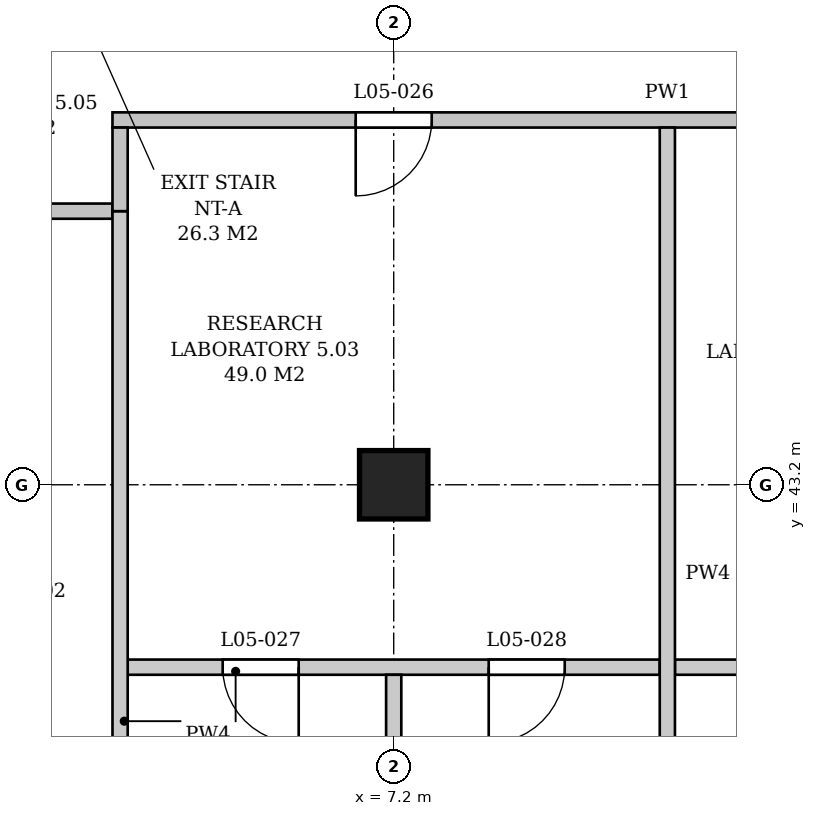
"""IFC4 building model, lengths in metres.
Left out: names, types, materials, properties, quantities, classifications, styles, units other than length and angle.
Written with IfcOpenShell. Run it as: python <this file> out.ifc"""

import sys

from ifc_helpers import new_model, si_unit, direction, frame, frame_2d, origin, origin_2d, place, context, subcontext, project, spatial, polyline, rectangle, outline, extrude, element, fill, save


model = new_model("IFC4")
c1 = context("Model", 3, precision=1e-05, world=origin(), true_north=direction((0.0, 1.0)))
c2 = subcontext(c1, "Body", "Model", "MODEL_VIEW")
j1 = project(units=[si_unit("LENGTHUNIT", "METRE"), si_unit("PLANEANGLEUNIT", "RADIAN")], contexts=[c1])
p1 = place(None, origin())
s1 = spatial("IfcSite", under=j1, at=p1, CompositionType="ELEMENT")
p2 = place(p1, origin())
s2 = spatial("IfcBuilding", under=s1, at=p2, CompositionType="ELEMENT")
p3 = place(p2, frame((0.0, 0.0, 26.4)))
s3 = spatial("IfcBuildingStorey", under=s2, at=p3, CompositionType="ELEMENT", Elevation=26.4)
p4 = place(p3, frame((7.2, 43.2, 0.0), z_axis=(0.0, 0.0, 1.0), x_axis=(1.0, 0.0, 0.0)))
e1 = element("IfcColumn", 1, at=p4, inside=s3, PredefinedType="COLUMN", context=c2, shape_type="SweptSolid", body=[
    extrude(rectangle(XDim=0.9, YDim=0.9, at=origin_2d()), origin(), (0.0, 0.0, 1.0), 4.8),
])
p5 = place(p3, frame((3.7, 40.8, 0.0), z_axis=(0.0, 0.0, 1.0), x_axis=(1.0, 0.0, 0.0)))
e2 = element("IfcWall", 2, at=p5, inside=s3, PredefinedType="PARTITIONING", context=c2, shape_type="SweptSolid", body=[
    extrude(outline(polyline([(0.0, 0.0), (7.0, 0.0), (7.0, 4.55), (3.75, 4.55), (3.75, 3.8), (3.25, 3.8), (3.25, 4.55), (0.0, 4.55), (0.0, 0.0)])), frame((0.0, 0.1, 0.0), z_axis=(0.0, -1.0, 0.0), x_axis=(1.0, 0.0, 0.0)), (0.0, 0.0, 1.0), 0.2),
])
p6 = place(p5, frame((1.25, 0.0, 0.0)))
e3 = element("IfcOpeningElement", 3, at=p6, cuts=e2, PredefinedType="OPENING", context=c2, shape_type="SweptSolid", body=[
    extrude(rectangle(XDim=1.0, YDim=2.1, at=frame_2d((0.5, 1.05))), frame((0.0, 0.11, 0.0), z_axis=(0.0, -1.0, 0.0), x_axis=(1.0, 0.0, 0.0)), (0.0, 0.0, 1.0), 0.22),
])
p7 = place(p5, frame((4.75, 0.0, 0.0)))
e4 = element("IfcOpeningElement", 4, at=p7, cuts=e2, PredefinedType="OPENING", context=c2, shape_type="SweptSolid", body=[
    extrude(rectangle(XDim=1.0, YDim=2.1, at=frame_2d((0.5, 1.05))), frame((0.0, 0.11, 0.0), z_axis=(0.0, -1.0, 0.0), x_axis=(1.0, 0.0, 0.0)), (0.0, 0.0, 1.0), 0.22),
])
p8 = place(p3, frame((10.9, 40.8, 0.0), z_axis=(0.0, 0.0, 1.0), x_axis=(1.0, 0.0, 0.0)))
e5 = element("IfcWall", 5, at=p8, inside=s3, PredefinedType="PARTITIONING", context=c2, shape_type="SweptSolid", body=[
    extrude(outline(polyline([(0.0, 0.0), (3.4, 0.0), (3.4, 3.8), (3.25, 3.8), (3.25, 4.55), (0.0, 4.55), (0.0, 0.0)])), frame((0.0, 0.1, 0.0), z_axis=(0.0, -1.0, 0.0), x_axis=(1.0, 0.0, 0.0)), (0.0, 0.0, 1.0), 0.2),
])
p9 = place(p8, frame((1.2, 0.0, 0.0)))
e6 = element("IfcOpeningElement", 6, at=p9, cuts=e5, PredefinedType="OPENING", context=c2, shape_type="SweptSolid", body=[
    extrude(rectangle(XDim=1.0, YDim=2.1, at=frame_2d((0.5, 1.05))), frame((0.0, 0.11, 0.0), z_axis=(0.0, -1.0, 0.0), x_axis=(1.0, 0.0, 0.0)), (0.0, 0.0, 1.0), 0.22),
])
p10 = place(p3, frame((0.15, 46.8, 0.0), z_axis=(0.0, 0.0, 1.0), x_axis=(1.0, 0.0, 0.0)))
e7 = element("IfcWall", 7, at=p10, inside=s3, PredefinedType="PARTITIONING", context=c2, shape_type="SweptSolid", body=[
    extrude(outline(polyline([(0.0, 0.0), (3.35, 0.0), (3.35, 4.55), (0.1, 4.55), (0.1, 3.95), (0.0, 3.95), (0.0, 0.0)])), frame((0.0, 0.1, 0.0), z_axis=(0.0, -1.0, 0.0), x_axis=(1.0, 0.0, 0.0)), (0.0, 0.0, 1.0), 0.2),
])
p11 = place(p10, frame((1.175, 0.0, 0.0)))
e8 = element("IfcOpeningElement", 8, at=p11, cuts=e7, PredefinedType="OPENING", context=c2, shape_type="SweptSolid", body=[
    extrude(rectangle(XDim=1.0, YDim=2.1, at=frame_2d((0.5, 1.05))), frame((0.0, 0.11, 0.0), z_axis=(0.0, -1.0, 0.0), x_axis=(1.0, 0.0, 0.0)), (0.0, 0.0, 1.0), 0.22),
])
p12 = place(p3, frame((3.5, 48.0, 0.0), z_axis=(0.0, 0.0, 1.0), x_axis=(1.0, 0.0, 0.0)))
e9 = element("IfcWall", 9, at=p12, inside=s3, PredefinedType="PARTITIONING", context=c2, shape_type="SweptSolid", body=[
    extrude(outline(polyline([(0.0, 0.0), (14.6, 0.0), (14.6, 4.55), (11.15, 4.55), (11.15, 3.8), (10.65, 3.8), (10.65, 4.55), (3.95, 4.55), (3.95, 3.8), (3.45, 3.8), (3.45, 4.55), (0.0, 4.55), (0.0, 0.0)])), frame((0.0, 0.1, 0.0), z_axis=(0.0, -1.0, 0.0), x_axis=(1.0, 0.0, 0.0)), (0.0, 0.0, 1.0), 0.2),
])
p13 = place(p12, frame((3.2, 0.0, 0.0)))
e10 = element("IfcOpeningElement", 10, at=p13, cuts=e9, PredefinedType="OPENING", context=c2, shape_type="SweptSolid", body=[
    extrude(rectangle(XDim=1.0, YDim=2.1, at=frame_2d((0.5, 1.05))), frame((0.0, 0.11, 0.0), z_axis=(0.0, -1.0, 0.0), x_axis=(1.0, 0.0, 0.0)), (0.0, 0.0, 1.0), 0.22),
])
p14 = place(p12, frame((8.6, 0.0, 0.0)))
e11 = element("IfcOpeningElement", 11, at=p14, cuts=e9, PredefinedType="OPENING", context=c2, shape_type="SweptSolid", body=[
    extrude(rectangle(XDim=1.0, YDim=2.1, at=frame_2d((0.5, 1.05))), frame((0.0, 0.11, 0.0), z_axis=(0.0, -1.0, 0.0), x_axis=(1.0, 0.0, 0.0)), (0.0, 0.0, 1.0), 0.22),
])
p15 = place(p3, frame((3.6, 36.15, 0.0), z_axis=(0.0, 0.0, 1.0), x_axis=(0.0, 1.0, 0.0)))
e12 = element("IfcWall", 12, at=p15, inside=s3, PredefinedType="PARTITIONING", context=c2, shape_type="SweptSolid", body=[
    extrude(outline(polyline([(0.0, 0.0), (10.65, 0.0), (10.65, 4.55), (7.3, 4.55), (7.3, 3.8), (6.8, 3.8), (6.8, 4.55), (0.1, 4.55), (0.1, 3.95), (0.0, 3.95), (0.0, 0.0)])), frame((0.0, 0.1, 0.0), z_axis=(0.0, -1.0, 0.0), x_axis=(1.0, 0.0, 0.0)), (0.0, 0.0, 1.0), 0.2),
])
p16 = place(p3, frame((3.6, 46.8, 0.0), z_axis=(0.0, 0.0, 1.0), x_axis=(0.0, 1.0, 0.0)))
e13 = element("IfcWall", 13, at=p16, inside=s3, PredefinedType="PARTITIONING", context=c2, shape_type="SweptSolid", body=[
    extrude(rectangle(XDim=1.1, YDim=0.2, at=frame_2d((0.55, 0.0))), origin(), (0.0, 0.0, 1.0), 4.55),
])
p17 = place(p3, frame((7.2, 36.45, 0.0), z_axis=(0.0, 0.0, 1.0), x_axis=(0.0, 1.0, 0.0)))
e14 = element("IfcWall", 14, at=p17, inside=s3, PredefinedType="PARTITIONING", context=c2, shape_type="SweptSolid", body=[
    extrude(rectangle(XDim=4.25, YDim=0.2, at=frame_2d((2.125, 0.0))), origin(), (0.0, 0.0, 1.0), 3.8),
])
p18 = place(p3, frame((10.8, 36.15, 0.0), z_axis=(0.0, 0.0, 1.0), x_axis=(0.0, 1.0, 0.0)))
e15 = element("IfcWall", 15, at=p18, inside=s3, PredefinedType="PARTITIONING", context=c2, shape_type="SweptSolid", body=[
    extrude(outline(polyline([(0.0, 0.0), (11.75, 0.0), (11.75, 4.55), (7.3, 4.55), (7.3, 3.8), (6.8, 3.8), (6.8, 4.55), (0.1, 4.55), (0.1, 3.95), (0.0, 3.95), (0.0, 0.0)])), frame((0.0, 0.1, 0.0), z_axis=(0.0, -1.0, 0.0), x_axis=(1.0, 0.0, 0.0)), (0.0, 0.0, 1.0), 0.2),
])
p19 = place(p13, frame((1.0, 0.0, 0.0), z_axis=(0.0, 0.0, 1.0), x_axis=(-1.0, 0.0, 0.0)))
e16 = element("IfcDoor", 16, at=p19, inside=s3, OperationType="SINGLE_SWING_RIGHT", PredefinedType="DOOR", context=c2, shape_type="SweptSolid", body=[
    extrude(rectangle(XDim=1.0, YDim=2.1, at=frame_2d((0.5, 1.05))), frame((0.0, 0.025, 0.0), z_axis=(0.0, -1.0, 0.0), x_axis=(1.0, 0.0, 0.0)), (0.0, 0.0, 1.0), 0.05),
])
fill(e10, e16)
p20 = place(p6, frame((1.0, 0.0, 0.0), z_axis=(0.0, 0.0, 1.0), x_axis=(-1.0, 0.0, 0.0)))
e17 = element("IfcDoor", 17, at=p20, inside=s3, OperationType="SINGLE_SWING_LEFT", PredefinedType="DOOR", context=c2, shape_type="SweptSolid", body=[
    extrude(rectangle(XDim=1.0, YDim=2.1, at=frame_2d((0.5, 1.05))), frame((0.0, 0.025, 0.0), z_axis=(0.0, -1.0, 0.0), x_axis=(1.0, 0.0, 0.0)), (0.0, 0.0, 1.0), 0.05),
])
fill(e3, e17)
p21 = place(p7, frame((1.0, 0.0, 0.0), z_axis=(0.0, 0.0, 1.0), x_axis=(-1.0, 0.0, 0.0)))
e18 = element("IfcDoor", 18, at=p21, inside=s3, OperationType="SINGLE_SWING_RIGHT", PredefinedType="DOOR", context=c2, shape_type="SweptSolid", body=[
    extrude(rectangle(XDim=1.0, YDim=2.1, at=frame_2d((0.5, 1.05))), frame((0.0, 0.025, 0.0), z_axis=(0.0, -1.0, 0.0), x_axis=(1.0, 0.0, 0.0)), (0.0, 0.0, 1.0), 0.05),
])
fill(e4, e18)
save(model, sys.argv[1])
